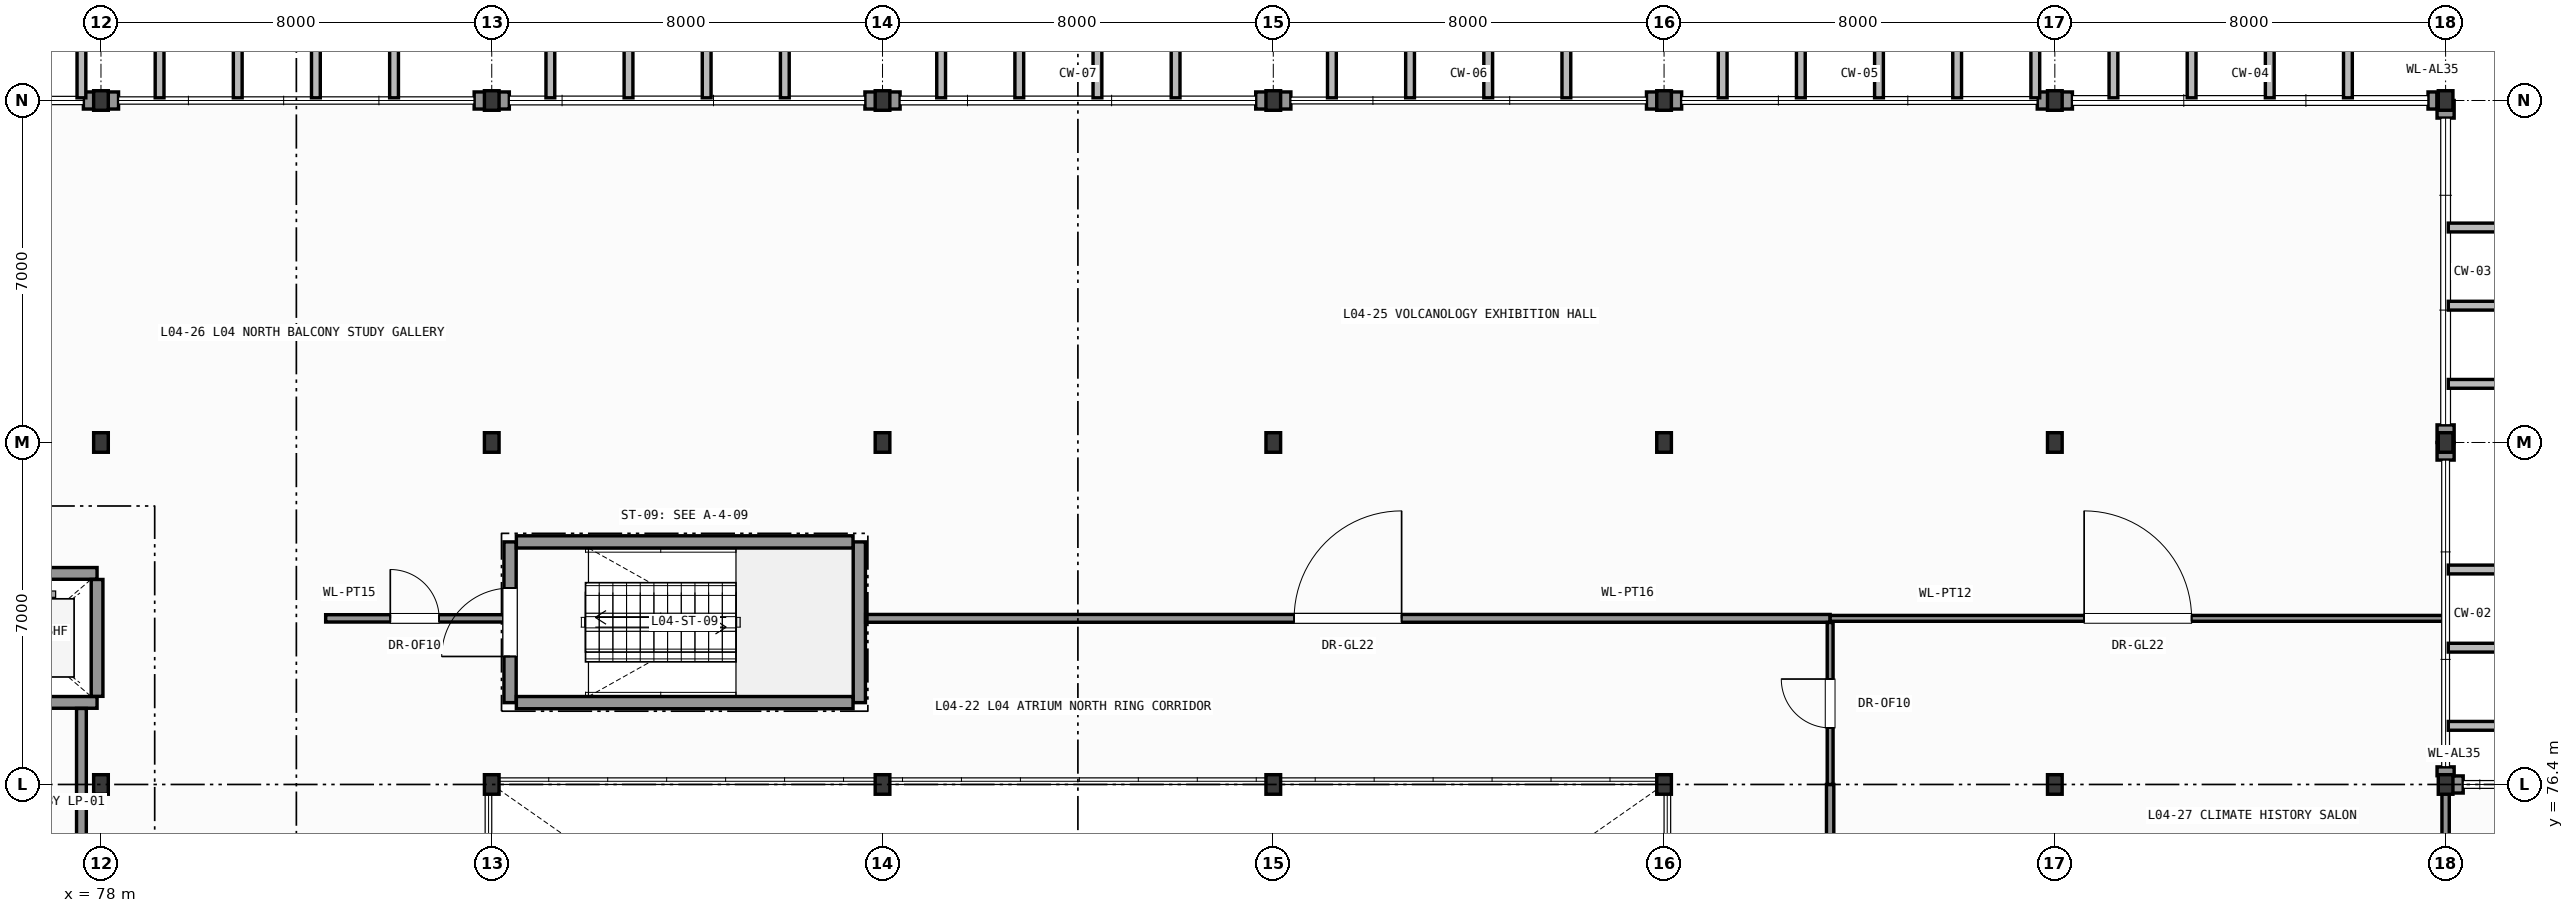
"""IFC4 building model, lengths in metres.
Left out: names, types, materials, properties, quantities, classifications, styles, units other than length and angle.
Written with IfcOpenShell. Run it as: python <this file> out.ifc"""

import sys

from ifc_helpers import new_model, si_unit, direction, frame, frame_2d, origin, origin_2d, place, context, subcontext, project, spatial, rectangle, i_section, extrude, element, fill, save


model = new_model("IFC4")
c1 = context("Model", 3, precision=1e-05, world=origin(), true_north=direction((0.0, 1.0)))
c2 = subcontext(c1, "Body", "Model", "MODEL_VIEW")
j1 = project(units=[si_unit("LENGTHUNIT", "METRE"), si_unit("PLANEANGLEUNIT", "RADIAN")], contexts=[c1])
p1 = place(None, origin())
s1 = spatial("IfcSite", under=j1, at=p1, CompositionType="ELEMENT")
p2 = place(p1, origin())
s2 = spatial("IfcBuilding", under=s1, at=p2, CompositionType="ELEMENT")
p3 = place(p2, frame((0.0, 0.0, 18.0)))
s3 = spatial("IfcBuildingStorey", under=s2, at=p3, CompositionType="ELEMENT", Elevation=18.0)
for number, where, z_axis, x_axis in (
    (1, (78.0, 76.4, 0.0), (0.0, 0.0, 1.0), (1.0, 0.0, 0.0)),
    (2, (78.0, 83.4, 0.0), (0.0, 0.0, 1.0), (1.0, 0.0, 0.0)),
    (3, (78.0, 90.4, 0.0), (0.0, 0.0, 1.0), (1.0, 0.0, 0.0)),
    (4, (86.0, 76.4, 0.0), (0.0, 0.0, 1.0), (1.0, 0.0, 0.0)),
    (5, (86.0, 83.4, 0.0), (0.0, 0.0, 1.0), (1.0, 0.0, 0.0)),
    (6, (86.0, 90.4, 0.0), (0.0, 0.0, 1.0), (1.0, 0.0, 0.0)),
    (7, (94.0, 76.4, 0.0), (0.0, 0.0, 1.0), (1.0, 0.0, 0.0)),
    (8, (94.0, 83.4, 0.0), (0.0, 0.0, 1.0), (1.0, 0.0, 0.0)),
    (9, (94.0, 90.4, 0.0), (0.0, 0.0, 1.0), (1.0, 0.0, 0.0)),
    (10, (102.0, 76.4, 0.0), (0.0, 0.0, 1.0), (1.0, 0.0, 0.0)),
    (11, (102.0, 83.4, 0.0), (0.0, 0.0, 1.0), (1.0, 0.0, 0.0)),
    (12, (102.0, 90.4, 0.0), (0.0, 0.0, 1.0), (1.0, 0.0, 0.0)),
    (13, (110.0, 76.4, 0.0), (0.0, 0.0, 1.0), (1.0, 0.0, 0.0)),
    (14, (110.0, 83.4, 0.0), (0.0, 0.0, 1.0), (1.0, 0.0, 0.0)),
    (15, (110.0, 90.4, 0.0), (0.0, 0.0, 1.0), (1.0, 0.0, 0.0)),
    (16, (118.0, 76.4, 0.0), (0.0, 0.0, 1.0), (1.0, 0.0, 0.0)),
    (17, (118.0, 83.4, 0.0), (0.0, 0.0, 1.0), (1.0, 0.0, 0.0)),
    (18, (118.0, 90.4, 0.0), (0.0, 0.0, 1.0), (1.0, 0.0, 0.0)),
    (19, (126.0, 76.4, 0.0), (0.0, 0.0, 1.0), (1.0, 0.0, 0.0)),
    (20, (126.0, 83.4, 0.0), (0.0, 0.0, 1.0), (1.0, 0.0, 0.0)),
    (21, (126.0, 90.4, 0.0), (0.0, 0.0, 1.0), (1.0, 0.0, 0.0)),
):
    element("IfcColumn", number, at=place(p3, frame(where, z_axis=z_axis, x_axis=x_axis)), inside=s3, PredefinedType="COLUMN", context=c2, shape_type="SweptSolid", body=[
        extrude(i_section(OverallWidth=0.3, OverallDepth=0.4, WebThickness=0.013, FlangeThickness=0.024, FilletRadius=0.027, at=origin_2d()), origin(), (0.0, 0.0, 1.0), 4.2),
    ])
p4 = place(p3, frame((126.36, 76.4, 0.0), z_axis=(0.0, 0.0, 1.0), x_axis=(-1.0, 0.0, 0.0)))
e22 = element("IfcWall", 22, at=p4, inside=s3, PredefinedType="SOLIDWALL", context=c2, shape_type="SweptSolid", body=[
    extrude(rectangle(XDim=0.36, YDim=0.35, at=frame_2d((0.18, 0.0))), origin(), (0.0, 0.0, 1.0), 3.98),
])
p5 = place(p3, frame((126.0, 76.579, 0.0), z_axis=(0.0, 0.0, 1.0), x_axis=(0.0, 1.0, 0.0)))
e23 = element("IfcWall", 23, at=p5, inside=s3, PredefinedType="SOLIDWALL", context=c2, shape_type="SweptSolid", body=[
    extrude(rectangle(XDim=0.181, YDim=0.35, at=frame_2d((0.09, 0.0))), origin(), (0.0, 0.0, 1.0), 3.98),
])
p6 = place(p3, frame((126.0, 83.04, 0.0), z_axis=(0.0, 0.0, 1.0), x_axis=(0.0, 1.0, 0.0)))
e24 = element("IfcWall", 24, at=p6, inside=s3, PredefinedType="SOLIDWALL", context=c2, shape_type="SweptSolid", body=[
    extrude(rectangle(XDim=0.36, YDim=0.35, at=frame_2d((0.18, 0.0))), origin(), (0.0, 0.0, 1.0), 3.525),
])
p7 = place(p3, frame((126.0, 83.4, 0.0), z_axis=(0.0, 0.0, 1.0), x_axis=(0.0, 1.0, 0.0)))
e25 = element("IfcWall", 25, at=p7, inside=s3, PredefinedType="SOLIDWALL", context=c2, shape_type="SweptSolid", body=[
    extrude(rectangle(XDim=0.36, YDim=0.35, at=frame_2d((0.18, 0.0))), origin(), (0.0, 0.0, 1.0), 3.525),
])
p8 = place(p3, frame((126.0, 90.04, 0.0), z_axis=(0.0, 0.0, 1.0), x_axis=(0.0, 1.0, 0.0)))
e26 = element("IfcWall", 26, at=p8, inside=s3, PredefinedType="SOLIDWALL", context=c2, shape_type="SweptSolid", body=[
    extrude(rectangle(XDim=0.36, YDim=0.35, at=frame_2d((0.18, 0.0))), origin(), (0.0, 0.0, 1.0), 3.525),
])
p9 = place(p3, frame((125.821, 90.4, 0.0), z_axis=(0.0, 0.0, 1.0), x_axis=(-1.0, 0.0, 0.0)))
e27 = element("IfcWall", 27, at=p9, inside=s3, PredefinedType="SOLIDWALL", context=c2, shape_type="SweptSolid", body=[
    extrude(rectangle(XDim=0.181, YDim=0.35, at=frame_2d((0.091, 0.0))), origin(), (0.0, 0.0, 1.0), 3.98),
])
for number, where, z_axis, x_axis in (
    (28, (118.36, 90.4, 0.0), (0.0, 0.0, 1.0), (-1.0, 0.0, 0.0)),
    (29, (118.0, 90.4, 0.0), (0.0, 0.0, 1.0), (-1.0, 0.0, 0.0)),
    (30, (110.36, 90.4, 0.0), (0.0, 0.0, 1.0), (-1.0, 0.0, 0.0)),
):
    element("IfcWall", number, at=place(p3, frame(where, z_axis=z_axis, x_axis=x_axis)), inside=s3, PredefinedType="SOLIDWALL", context=c2, shape_type="SweptSolid", body=[
        extrude(rectangle(XDim=0.36, YDim=0.35, at=frame_2d((0.18, 0.0))), origin(), (0.0, 0.0, 1.0), 2.965),
    ])
for number, where, z_axis, x_axis in (
    (31, (110.0, 90.4, 0.0), (0.0, 0.0, 1.0), (-1.0, 0.0, 0.0)),
    (32, (102.36, 90.4, 0.0), (0.0, 0.0, 1.0), (-1.0, 0.0, 0.0)),
    (33, (102.0, 90.4, 0.0), (0.0, 0.0, 1.0), (-1.0, 0.0, 0.0)),
    (34, (94.36, 90.4, 0.0), (0.0, 0.0, 1.0), (-1.0, 0.0, 0.0)),
    (35, (94.0, 90.4, 0.0), (0.0, 0.0, 1.0), (-1.0, 0.0, 0.0)),
    (36, (86.36, 90.4, 0.0), (0.0, 0.0, 1.0), (-1.0, 0.0, 0.0)),
):
    element("IfcWall", number, at=place(p3, frame(where, z_axis=z_axis, x_axis=x_axis)), inside=s3, PredefinedType="SOLIDWALL", context=c2, shape_type="SweptSolid", body=[
        extrude(rectangle(XDim=0.36, YDim=0.35, at=frame_2d((0.18, 0.0))), origin(), (0.0, 0.0, 1.0), 3.575),
    ])
for number, where, z_axis, x_axis in (
    (37, (86.0, 90.4, 0.0), (0.0, 0.0, 1.0), (-1.0, 0.0, 0.0)),
    (38, (78.36, 90.4, 0.0), (0.0, 0.0, 1.0), (-1.0, 0.0, 0.0)),
    (39, (78.0, 90.4, 0.0), (0.0, 0.0, 1.0), (-1.0, 0.0, 0.0)),
):
    element("IfcWall", number, at=place(p3, frame(where, z_axis=z_axis, x_axis=x_axis)), inside=s3, PredefinedType="SOLIDWALL", context=c2, shape_type="SweptSolid", body=[
        extrude(rectangle(XDim=0.36, YDim=0.35, at=frame_2d((0.18, 0.0))), origin(), (0.0, 0.0, 1.0), 2.965),
    ])
p10 = place(p3, frame((86.375, 78.075, 0.0), z_axis=(0.0, 0.0, 1.0), x_axis=(0.0, 1.0, 0.0)))
e40 = element("IfcWall", 40, at=p10, inside=s3, PredefinedType="SHEAR", context=c2, shape_type="SweptSolid", body=[
    extrude(rectangle(XDim=3.29, YDim=0.25, at=frame_2d((1.645, 0.0))), origin(), (0.0, 0.0, 1.0), 3.98),
])
p11 = place(p10, frame((0.945, 0.0, 0.0)))
e41 = element("IfcOpeningElement", 41, at=p11, cuts=e40, PredefinedType="OPENING", context=c2, shape_type="SweptSolid", body=[
    extrude(rectangle(XDim=1.4, YDim=2.2, at=frame_2d((0.7, 1.1))), frame((0.0, 0.135, 0.0), z_axis=(0.0, -1.0, 0.0), x_axis=(1.0, 0.0, 0.0)), (0.0, 0.0, 1.0), 0.27),
])
p12 = place(p3, frame((93.525, 78.075, 0.0), z_axis=(0.0, 0.0, 1.0), x_axis=(0.0, 1.0, 0.0)))
e42 = element("IfcWall", 42, at=p12, inside=s3, PredefinedType="SHEAR", context=c2, shape_type="SweptSolid", body=[
    extrude(rectangle(XDim=3.29, YDim=0.25, at=frame_2d((1.645, 0.0))), origin(), (0.0, 0.0, 1.0), 3.98),
])
for number, where, z_axis, x_axis in (
    (43, (86.504, 78.075, 0.0), (0.0, 0.0, 1.0), (1.0, 0.0, 0.0)),
    (44, (86.504, 81.365, 0.0), (0.0, 0.0, 1.0), (1.0, 0.0, 0.0)),
):
    element("IfcWall", number, at=place(p3, frame(where, z_axis=z_axis, x_axis=x_axis)), inside=s3, PredefinedType="SHEAR", context=c2, shape_type="SweptSolid", body=[
        extrude(rectangle(XDim=6.892, YDim=0.25, at=frame_2d((3.446, 0.0))), origin(), (0.0, 0.0, 1.0), 3.98),
    ])
p13 = place(p3, frame((74.88, 78.08, 0.0), z_axis=(0.0, 0.0, 1.0), x_axis=(1.0, 0.0, 0.0)))
e45 = element("IfcWall", 45, at=p13, inside=s3, PredefinedType="SHEAR", context=c2, shape_type="SweptSolid", body=[
    extrude(rectangle(XDim=3.04, YDim=0.24, at=frame_2d((1.52, 0.0))), origin(), (0.0, 0.0, 1.0), 3.98),
])
p14 = place(p13, frame((0.97, 0.0, 0.0)))
e46 = element("IfcOpeningElement", 46, at=p14, cuts=e45, PredefinedType="OPENING", context=c2, shape_type="SweptSolid", body=[
    extrude(rectangle(XDim=1.1, YDim=2.2, at=frame_2d((0.55, 1.1))), frame((0.0, 0.13, 0.0), z_axis=(0.0, -1.0, 0.0), x_axis=(1.0, 0.0, 0.0)), (0.0, 0.0, 1.0), 0.26),
])
p15 = place(p3, frame((74.88, 80.72, 0.0), z_axis=(0.0, 0.0, 1.0), x_axis=(1.0, 0.0, 0.0)))
e47 = element("IfcWall", 47, at=p15, inside=s3, PredefinedType="SHEAR", context=c2, shape_type="SweptSolid", body=[
    extrude(rectangle(XDim=3.04, YDim=0.24, at=frame_2d((1.52, 0.0))), origin(), (0.0, 0.0, 1.0), 3.98),
])
p16 = place(p3, frame((77.92, 78.204, 0.0), z_axis=(0.0, 0.0, 1.0), x_axis=(0.0, 1.0, 0.0)))
e48 = element("IfcWall", 48, at=p16, inside=s3, PredefinedType="SHEAR", context=c2, shape_type="SweptSolid", body=[
    extrude(rectangle(XDim=2.392, YDim=0.24, at=frame_2d((1.196, 0.0))), origin(), (0.0, 0.0, 1.0), 3.98),
])
p17 = place(p3, frame((77.6, 74.304, 0.0), z_axis=(0.0, 0.0, 1.0), x_axis=(0.0, 1.0, 0.0)))
e49 = element("IfcWall", 49, at=p17, inside=s3, PredefinedType="PARTITIONING", context=c2, shape_type="SweptSolid", body=[
    extrude(rectangle(XDim=3.652, YDim=0.2, at=frame_2d((1.826, 0.0))), origin(), (0.0, 0.0, 1.0), 3.98),
])
p18 = place(p3, frame((113.4, 71.6, 0.0), z_axis=(0.0, 0.0, 1.0), x_axis=(0.0, 1.0, 0.0)))
e50 = element("IfcWall", 50, at=p18, inside=s3, PredefinedType="PARTITIONING", context=c2, shape_type="SweptSolid", body=[
    extrude(rectangle(XDim=4.8, YDim=0.15, at=frame_2d((2.4, 0.0))), origin(), (0.0, 0.0, 1.0), 3.98),
])
p19 = place(p18, frame((1.5, 0.0, 0.0)))
e51 = element("IfcOpeningElement", 51, at=p19, cuts=e50, PredefinedType="OPENING", context=c2, shape_type="SweptSolid", body=[
    extrude(rectangle(XDim=1.8, YDim=2.4, at=frame_2d((0.9, 1.2))), frame((0.0, 0.085, 0.0), z_axis=(0.0, -1.0, 0.0), x_axis=(1.0, 0.0, 0.0)), (0.0, 0.0, 1.0), 0.17),
])
p20 = place(p3, frame((93.654, 79.8, 0.0), z_axis=(0.0, 0.0, 1.0), x_axis=(1.0, 0.0, 0.0)))
e52 = element("IfcWall", 52, at=p20, inside=s3, PredefinedType="PARTITIONING", context=c2, shape_type="SweptSolid", body=[
    extrude(rectangle(XDim=19.746, YDim=0.16, at=frame_2d((9.873, 0.0))), origin(), (0.0, 0.0, 1.0), 3.605),
])
p21 = place(p20, frame((8.773, 0.0, 0.0)))
e53 = element("IfcOpeningElement", 53, at=p21, cuts=e52, PredefinedType="OPENING", context=c2, shape_type="SweptSolid", body=[
    extrude(rectangle(XDim=2.2, YDim=2.6, at=frame_2d((1.1, 1.3))), frame((0.0, 0.09, 0.0), z_axis=(0.0, -1.0, 0.0), x_axis=(1.0, 0.0, 0.0)), (0.0, 0.0, 1.0), 0.18),
])
p22 = place(p3, frame((82.6, 79.8, 0.0), z_axis=(0.0, 0.0, 1.0), x_axis=(1.0, 0.0, 0.0)))
e54 = element("IfcWall", 54, at=p22, inside=s3, PredefinedType="PARTITIONING", context=c2, shape_type="SweptSolid", body=[
    extrude(rectangle(XDim=3.646, YDim=0.15, at=frame_2d((1.823, 0.0))), origin(), (0.0, 0.0, 1.0), 3.635),
])
p23 = place(p22, frame((1.323, 0.0, 0.0)))
e55 = element("IfcOpeningElement", 55, at=p23, cuts=e54, PredefinedType="OPENING", context=c2, shape_type="SweptSolid", body=[
    extrude(rectangle(XDim=1.0, YDim=2.15, at=frame_2d((0.5, 1.075))), frame((0.0, 0.085, 0.0), z_axis=(0.0, -1.0, 0.0), x_axis=(1.0, 0.0, 0.0)), (0.0, 0.0, 1.0), 0.17),
])
p24 = place(p3, frame((113.4, 76.4, 0.0), z_axis=(0.0, 0.0, 1.0), x_axis=(0.0, 1.0, 0.0)))
e56 = element("IfcWall", 56, at=p24, inside=s3, PredefinedType="PARTITIONING", context=c2, shape_type="SweptSolid", body=[
    extrude(rectangle(XDim=3.316, YDim=0.12, at=frame_2d((1.658, 0.0))), origin(), (0.0, 0.0, 1.0), 3.98),
])
p25 = place(p24, frame((1.158, 0.0, 0.0)))
e57 = element("IfcOpeningElement", 57, at=p25, cuts=e56, PredefinedType="OPENING", context=c2, shape_type="SweptSolid", body=[
    extrude(rectangle(XDim=1.0, YDim=2.15, at=frame_2d((0.5, 1.075))), frame((0.0, 0.07, 0.0), z_axis=(0.0, -1.0, 0.0), x_axis=(1.0, 0.0, 0.0)), (0.0, 0.0, 1.0), 0.14),
])
p26 = place(p3, frame((113.4, 79.8, 0.0), z_axis=(0.0, 0.0, 1.0), x_axis=(1.0, 0.0, 0.0)))
e58 = element("IfcWall", 58, at=p26, inside=s3, PredefinedType="PARTITIONING", context=c2, shape_type="SweptSolid", body=[
    extrude(rectangle(XDim=12.6, YDim=0.12, at=frame_2d((6.3, 0.0))), origin(), (0.0, 0.0, 1.0), 3.605),
])
p27 = place(p26, frame((5.2, 0.0, 0.0)))
e59 = element("IfcOpeningElement", 59, at=p27, cuts=e58, PredefinedType="OPENING", context=c2, shape_type="SweptSolid", body=[
    extrude(rectangle(XDim=2.2, YDim=2.6, at=frame_2d((1.1, 1.3))), frame((0.0, 0.07, 0.0), z_axis=(0.0, -1.0, 0.0), x_axis=(1.0, 0.0, 0.0)), (0.0, 0.0, 1.0), 0.14),
])
p28 = place(p3, frame((126.0, 71.684, 0.0), z_axis=(0.0, 0.0, 1.0), x_axis=(0.0, 1.0, 0.0)))
e60 = element("IfcWall", 60, at=p28, inside=s3, PredefinedType="PARTITIONING", context=c2, shape_type="SweptSolid", body=[
    extrude(rectangle(XDim=4.537, YDim=0.15, at=frame_2d((2.269, 0.0))), origin(), (0.0, 0.0, 1.0), 3.525),
])
p29 = place(p28, frame((1.368, 0.0, 0.0)))
e61 = element("IfcOpeningElement", 61, at=p29, cuts=e60, PredefinedType="OPENING", context=c2, shape_type="SweptSolid", body=[
    extrude(rectangle(XDim=1.8, YDim=2.4, at=frame_2d((0.9, 1.2))), frame((0.0, 0.085, 0.0), z_axis=(0.0, -1.0, 0.0), x_axis=(1.0, 0.0, 0.0)), (0.0, 0.0, 1.0), 0.17),
])
p30 = place(p11, origin())
e62 = element("IfcDoor", 62, at=p30, inside=s3, OperationType="SINGLE_SWING_LEFT", PredefinedType="DOOR", context=c2, shape_type="SweptSolid", body=[
    extrude(rectangle(XDim=1.4, YDim=2.2, at=frame_2d((0.7, 1.1))), frame((0.0, 0.025, 0.0), z_axis=(0.0, -1.0, 0.0), x_axis=(1.0, 0.0, 0.0)), (0.0, 0.0, 1.0), 0.05),
])
fill(e41, e62)
p31 = place(p21, origin())
e63 = element("IfcDoor", 63, at=p31, inside=s3, OperationType="SINGLE_SWING_RIGHT", PredefinedType="DOOR", context=c2, shape_type="SweptSolid", body=[
    extrude(rectangle(XDim=2.2, YDim=2.6, at=frame_2d((1.1, 1.3))), frame((0.0, 0.025, 0.0), z_axis=(0.0, -1.0, 0.0), x_axis=(1.0, 0.0, 0.0)), (0.0, 0.0, 1.0), 0.05),
])
fill(e53, e63)
p32 = place(p23, origin())
e64 = element("IfcDoor", 64, at=p32, inside=s3, OperationType="SINGLE_SWING_LEFT", PredefinedType="DOOR", context=c2, shape_type="SweptSolid", body=[
    extrude(rectangle(XDim=1.0, YDim=2.15, at=frame_2d((0.5, 1.075))), frame((0.0, 0.025, 0.0), z_axis=(0.0, -1.0, 0.0), x_axis=(1.0, 0.0, 0.0)), (0.0, 0.0, 1.0), 0.05),
])
fill(e55, e64)
p33 = place(p25, origin())
e65 = element("IfcDoor", 65, at=p33, inside=s3, OperationType="SINGLE_SWING_RIGHT", PredefinedType="DOOR", context=c2, shape_type="SweptSolid", body=[
    extrude(rectangle(XDim=1.0, YDim=2.15, at=frame_2d((0.5, 1.075))), frame((0.0, 0.025, 0.0), z_axis=(0.0, -1.0, 0.0), x_axis=(1.0, 0.0, 0.0)), (0.0, 0.0, 1.0), 0.05),
])
fill(e57, e65)
p34 = place(p27, origin())
e66 = element("IfcDoor", 66, at=p34, inside=s3, OperationType="SINGLE_SWING_LEFT", PredefinedType="DOOR", context=c2, shape_type="SweptSolid", body=[
    extrude(rectangle(XDim=2.2, YDim=2.6, at=frame_2d((1.1, 1.3))), frame((0.0, 0.025, 0.0), z_axis=(0.0, -1.0, 0.0), x_axis=(1.0, 0.0, 0.0)), (0.0, 0.0, 1.0), 0.05),
])
fill(e59, e66)
save(model, sys.argv[1])
